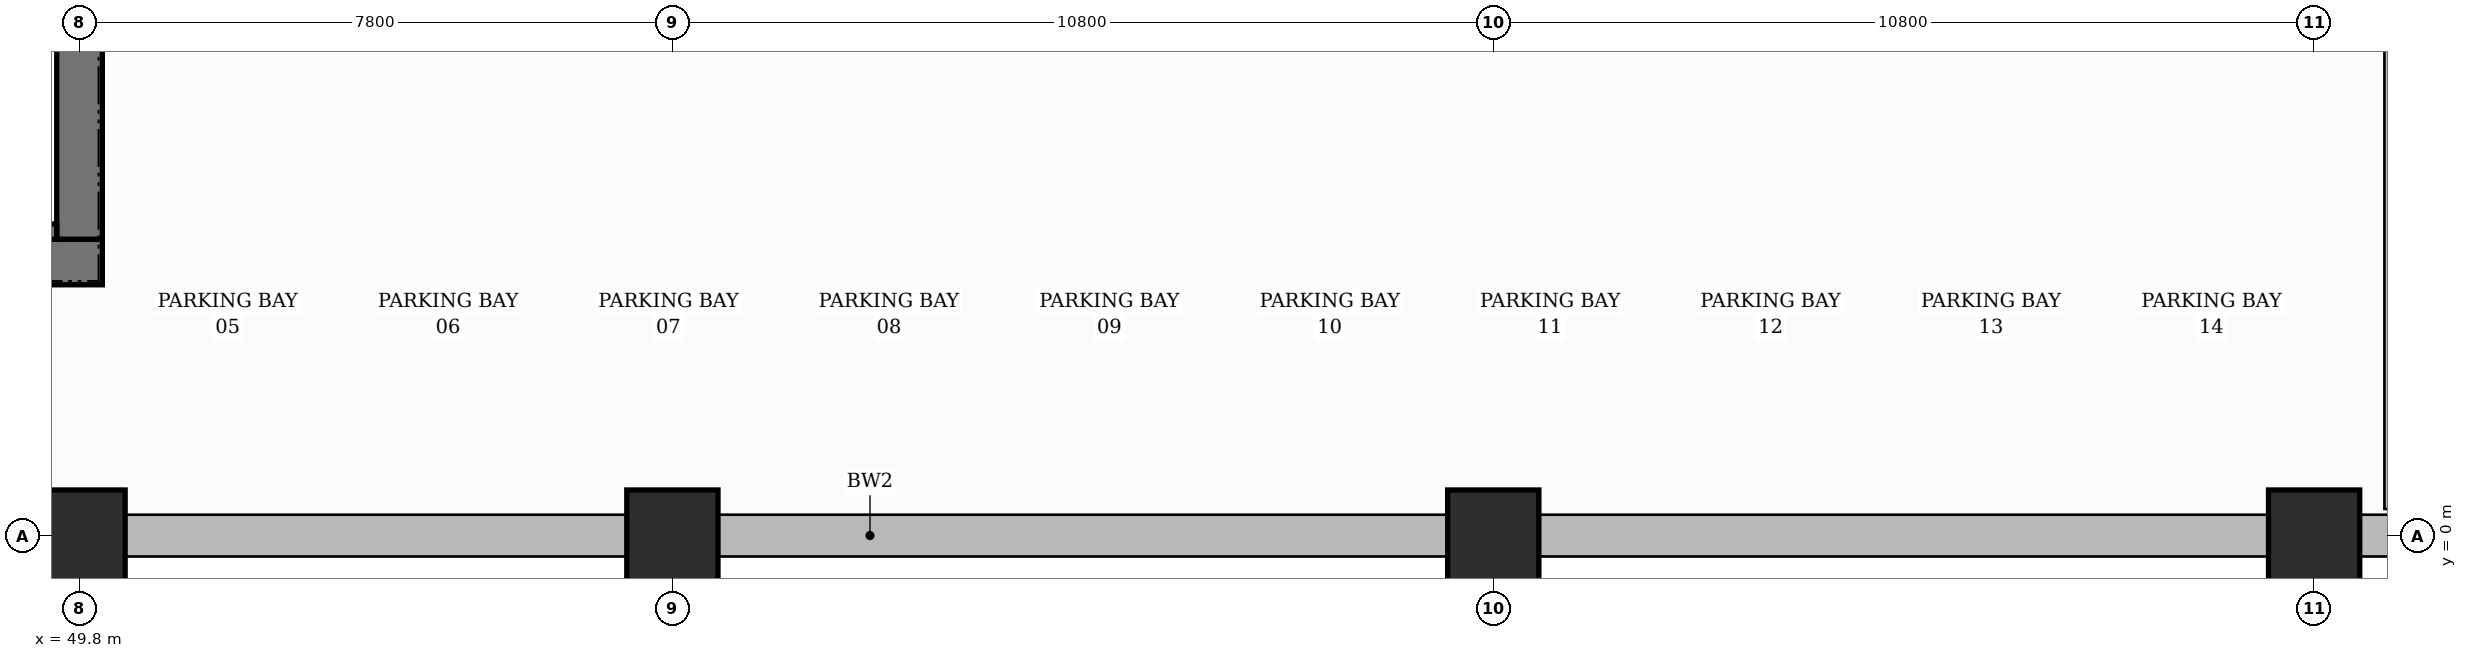
"""IFC4 building model, lengths in metres.
Left out: names, types, materials, properties, quantities, classifications, styles, units other than length and angle.
Written with IfcOpenShell. Run it as: python <this file> out.ifc"""

import sys

from ifc_helpers import new_model, si_unit, direction, frame, frame_2d, origin, origin_2d, place, context, subcontext, project, spatial, rectangle, extrude, source, transform, mapped, element, save


model = new_model("IFC4")
c1 = context("Model", 3, precision=1e-05, world=origin(), true_north=direction((0.0, 1.0)))
c2 = subcontext(c1, "Body", "Model", "MODEL_VIEW")
j1 = project(units=[si_unit("LENGTHUNIT", "METRE"), si_unit("PLANEANGLEUNIT", "RADIAN")], contexts=[c1])
p1 = place(None, origin())
s1 = spatial("IfcSite", under=j1, at=p1, CompositionType="ELEMENT")
p2 = place(p1, origin())
s2 = spatial("IfcBuilding", under=s1, at=p2, CompositionType="ELEMENT")
p3 = place(p2, frame((0.0, 0.0, -6.5)))
s3 = spatial("IfcBuildingStorey", under=s2, at=p3, CompositionType="ELEMENT", Elevation=-6.5)
p4 = place(p3, frame((-4.8, 0.0, 0.0), z_axis=(0.0, 0.0, 1.0), x_axis=(1.0, 0.0, 0.0)))
e1 = element("IfcWall", 1, at=p4, inside=s3, PredefinedType="USERDEFINED", context=c2, shape_type="SweptSolid", body=[
    extrude(rectangle(XDim=85.2, YDim=0.55, at=frame_2d((42.6, 0.0))), origin(), (0.0, 0.0, 1.0), 6.5),
])
p5 = place(p3, frame((80.4, 0.35, 0.0), z_axis=(0.0, 0.0, 1.0), x_axis=(0.0, 1.0, 0.0)))
e2 = element("IfcWall", 2, at=p5, inside=s3, PredefinedType="USERDEFINED", context=c2, shape_type="SweptSolid", body=[
    extrude(rectangle(XDim=46.1, YDim=0.55, at=frame_2d((23.05, 0.0))), origin(), (0.0, 0.0, 1.0), 6.5),
])
p6 = place(p3, frame((34.5, 3.6, 0.0), z_axis=(0.0, 0.0, 1.0), x_axis=(1.0, 0.0, 0.0)))
e3 = element("IfcWall", 3, at=p6, inside=s3, PredefinedType="SHEAR", context=c2, shape_type="SweptSolid", body=[
    extrude(rectangle(XDim=15.6, YDim=0.6, at=frame_2d((7.8, 0.0))), origin(), (0.0, 0.0, 1.0), 6.5),
])
p7 = place(p6, frame((4.13, 0.0, 0.0)))
e4 = element("IfcOpeningElement", 4, at=p7, cuts=e3, PredefinedType="OPENING", context=c2, shape_type="SweptSolid", body=[
    extrude(rectangle(XDim=0.9, YDim=2.1, at=frame_2d((0.45, 1.05))), frame((0.0, 0.31, 0.0), z_axis=(0.0, -1.0, 0.0), x_axis=(1.0, 0.0, 0.0)), (0.0, 0.0, 1.0), 0.62),
])
p8 = place(p6, frame((5.7, 0.0, 0.0)))
e5 = element("IfcOpeningElement", 5, at=p8, cuts=e3, PredefinedType="OPENING", context=c2, shape_type="SweptSolid", body=[
    extrude(rectangle(XDim=0.9, YDim=2.1, at=frame_2d((0.45, 1.05))), frame((0.0, 0.31, 0.0), z_axis=(0.0, -1.0, 0.0), x_axis=(1.0, 0.0, 0.0)), (0.0, 0.0, 1.0), 0.62),
])
p9 = place(p6, frame((7.3, 0.0, 0.0)))
e6 = element("IfcOpeningElement", 6, at=p9, cuts=e3, PredefinedType="OPENING", context=c2, shape_type="SweptSolid", body=[
    extrude(rectangle(XDim=0.9, YDim=2.1, at=frame_2d((0.45, 1.05))), frame((0.0, 0.31, 0.0), z_axis=(0.0, -1.0, 0.0), x_axis=(1.0, 0.0, 0.0)), (0.0, 0.0, 1.0), 0.62),
])
p10 = place(p3, frame((49.8, 3.9, 0.0), z_axis=(0.0, 0.0, 1.0), x_axis=(0.0, 1.0, 0.0)))
e7 = element("IfcWall", 7, at=p10, inside=s3, PredefinedType="SHEAR", context=c2, shape_type="SweptSolid", body=[
    extrude(rectangle(XDim=10.2, YDim=0.6, at=frame_2d((5.1, 0.0))), origin(), (0.0, 0.0, 1.0), 6.5),
])
m1 = source(origin(), c2, "Body", "SweptSolid", [
    extrude(rectangle(XDim=1.2, YDim=1.2, at=origin_2d()), origin(), (0.0, 0.0, 1.0), 6.5),
])
for number, where, z_axis, x_axis in (
    (8, (49.8, 0.0, 0.0), (0.0, 0.0, 1.0), (1.0, 0.0, 0.0)),
    (9, (57.6, 0.0, 0.0), (0.0, 0.0, 1.0), (1.0, 0.0, 0.0)),
    (10, (68.4, 0.0, 0.0), (0.0, 0.0, 1.0), (1.0, 0.0, 0.0)),
    (11, (79.2, 0.0, 0.0), (0.0, 0.0, 1.0), (1.0, 0.0, 0.0)),
):
    element("IfcColumn", number, at=place(p3, frame(where, z_axis=z_axis, x_axis=x_axis)), inside=s3, PredefinedType="COLUMN", context=c2, shape_type="MappedRepresentation", body=[
        mapped(m1, transform((0.0, 0.0, 0.0), scale=1.0)),
    ])
p11 = place(p3, frame((43.12, 4.0, 0.0), z_axis=(0.0, 0.0, 1.0), x_axis=(1.0, 0.0, 0.0)))
e12 = element("IfcWall", 12, at=p11, inside=s3, PredefinedType="SHEAR", context=c2, shape_type="SweptSolid", body=[
    extrude(rectangle(XDim=6.38, YDim=0.2, at=frame_2d((3.19, 0.0))), origin(), (0.0, 0.0, 1.0), 6.5),
])
save(model, sys.argv[1])
